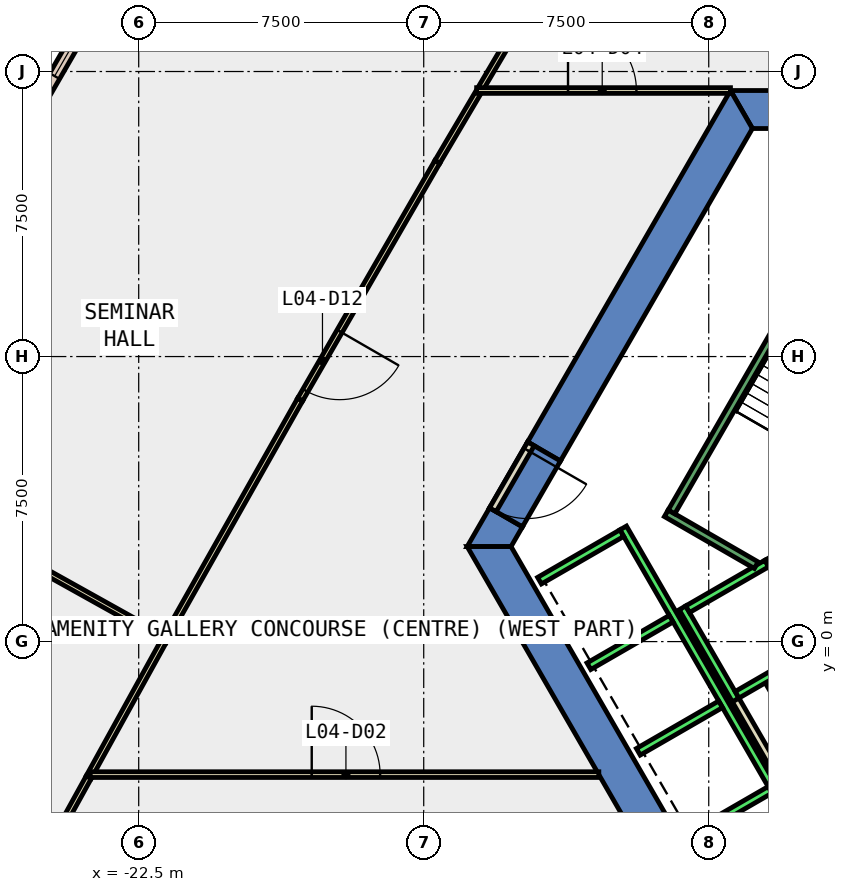
"""IFC4 building model, lengths in metres.
Left out: names, types, materials, properties, quantities, classifications, styles, units other than length and angle.
Written with IfcOpenShell. Run it as: python <this file> out.ifc"""

import sys

from ifc_helpers import new_model, si_unit, direction, frame, frame_2d, origin, place, context, subcontext, project, spatial, polyline, rectangle, outline, extrude, element, fill, save


model = new_model("IFC4")
c1 = context("Model", 3, precision=1e-05, world=origin(), true_north=direction((0.0, 1.0)))
c2 = subcontext(c1, "Body", "Model", "MODEL_VIEW")
j1 = project(units=[si_unit("LENGTHUNIT", "METRE"), si_unit("PLANEANGLEUNIT", "RADIAN")], contexts=[c1])
p1 = place(None, origin())
s1 = spatial("IfcSite", under=j1, at=p1, CompositionType="ELEMENT")
p2 = place(p1, origin())
s2 = spatial("IfcBuilding", under=s1, at=p2, CompositionType="ELEMENT")
p3 = place(p2, frame((0.0, 0.0, 25.0)))
s3 = spatial("IfcBuildingStorey", under=s2, at=p3, CompositionType="ELEMENT", Elevation=25.0)
p4 = place(p3, frame((0.0, 0.0, -0.45)))
e1 = element("IfcWall", 1, at=p4, inside=s3, PredefinedType="SHEAR", context=c2, shape_type="SweptSolid", body=[
    extrude(outline(polyline([(-4.55, 13.5), (-4.55, 14.5), (-6.928, 14.5), (-6.351, 13.5), (-4.55, 13.5)])), origin(), (0.0, 0.0, 1.0), 5.0),
])
p5 = place(p3, frame((0.0, 0.0, -0.45)))
e2 = element("IfcWall", 2, at=p5, inside=s3, PredefinedType="SHEAR", context=c2, shape_type="SweptSolid", body=[
    extrude(outline(polyline([(-12.267, 5.252), (-11.402, 4.752), (-6.351, 13.5), (-6.928, 14.5), (-12.267, 5.252)])), origin(), (0.0, 0.0, 1.0), 5.0),
])
p6 = place(p3, frame((0.0, 0.0, -0.45)))
e3 = element("IfcWall", 3, at=p6, inside=s3, PredefinedType="SHEAR", context=c2, shape_type="SweptSolid", body=[
    extrude(outline(polyline([(-12.402, 3.02), (-13.267, 3.52), (-13.856, 2.5), (-12.702, 2.5), (-12.402, 3.02)])), origin(), (0.0, 0.0, 1.0), 5.0),
])
p7 = place(p3, frame((0.0, 0.0, 3.6)))
e4 = element("IfcWall", 4, at=p7, inside=s3, PredefinedType="SHEAR", context=c2, shape_type="SweptSolid", body=[
    extrude(outline(polyline([(-13.267, 3.52), (-12.402, 3.02), (-11.402, 4.752), (-12.267, 5.252), (-13.267, 3.52)])), origin(), (0.0, 0.0, 1.0), 0.95),
])
p8 = place(p3, frame((0.0, 0.0, -0.45)))
e5 = element("IfcWall", 5, at=p8, inside=s3, PredefinedType="SHEAR", context=c2, shape_type="SweptSolid", body=[
    extrude(outline(polyline([(-13.856, 2.5), (-6.928, -9.5), (-6.351, -8.5), (-12.702, 2.5), (-13.856, 2.5)])), origin(), (0.0, 0.0, 1.0), 5.0),
])
p9 = place(p3, frame((-23.447, 17.071, 0.0), z_axis=(0.0, 0.0, 1.0), x_axis=(-0.499939977436, -0.866060055055, 0.0)))
e6 = element("IfcWall", 6, at=p9, inside=s3, PredefinedType="STANDARD", context=c2, shape_type="SweptSolid", body=[
    extrude(rectangle(XDim=6.121, YDim=0.3, at=frame_2d((3.061, 0.0))), origin(), (0.0, 0.0, 1.0), 4.55),
])
p10 = place(p9, frame((0.53, 0.0, 1.0)))
e7 = element("IfcOpeningElement", 7, at=p10, cuts=e6, PredefinedType="OPENING", context=c2, shape_type="SweptSolid", body=[
    extrude(rectangle(XDim=2.0, YDim=3.2, at=frame_2d((1.0, 1.6))), frame((0.0, 0.16, 0.0), z_axis=(0.0, -1.0, 0.0), x_axis=(1.0, 0.0, 0.0)), (0.0, 0.0, 1.0), 0.32),
])
p11 = place(p9, frame((3.591, 0.0, 1.0)))
e8 = element("IfcOpeningElement", 8, at=p11, cuts=e6, PredefinedType="OPENING", context=c2, shape_type="SweptSolid", body=[
    extrude(rectangle(XDim=2.0, YDim=3.2, at=frame_2d((1.0, 1.6))), frame((0.0, 0.16, 0.0), z_axis=(0.0, -1.0, 0.0), x_axis=(1.0, 0.0, 0.0)), (0.0, 0.0, 1.0), 0.32),
])
p12 = place(p3, frame((-5.126, -2.422, 0.0), z_axis=(0.0, 0.0, 1.0), x_axis=(-0.500062241894, 0.865989465428, 0.0)))
e9 = element("IfcWall", 9, at=p12, inside=s3, PredefinedType="PARTITIONING", context=c2, shape_type="SweptSolid", body=[
    extrude(rectangle(XDim=1.7, YDim=0.2, at=frame_2d((0.85, 0.0))), origin(), (0.0, 0.0, 1.0), 4.55),
])
p13 = place(p3, frame((-5.492, -3.788, 0.0), z_axis=(0.0, 0.0, 1.0), x_axis=(-0.500008949224, 0.866020236886, 0.0)))
e10 = element("IfcWall", 10, at=p13, inside=s3, PredefinedType="PARTITIONING", context=c2, shape_type="SweptSolid", body=[
    extrude(rectangle(XDim=2.68, YDim=0.2, at=frame_2d((1.34, 0.0))), origin(), (0.0, 0.0, 1.0), 4.55),
])
p14 = place(p3, frame((-21.735, 0.044, 0.0), z_axis=(0.0, 0.0, 1.0), x_axis=(-0.873435565137, 0.486939743248, 0.0)))
e11 = element("IfcWall", 11, at=p14, inside=s3, PredefinedType="PARTITIONING", context=c2, shape_type="SweptSolid", body=[
    extrude(rectangle(XDim=8.356, YDim=0.15, at=frame_2d((4.178, 0.0))), origin(), (0.0, 0.0, 1.0), 4.55),
])
p15 = place(p3, frame((-13.571, 14.435, 0.0), z_axis=(0.0, 0.0, 1.0), x_axis=(-0.508494775472, -0.861065074961, 0.0)))
e12 = element("IfcWall", 12, at=p15, inside=s3, PredefinedType="PARTITIONING", context=c2, shape_type="SweptSolid", body=[
    extrude(rectangle(XDim=2.104, YDim=0.15, at=frame_2d((1.052, 0.0))), origin(), (0.0, 0.0, 1.0), 4.55),
])
p16 = place(p3, frame((-14.641, 12.623, 0.0), z_axis=(0.0, 0.0, 1.0), x_axis=(-0.499941911129, -0.866058938812, 0.0)))
e13 = element("IfcWall", 13, at=p16, inside=s3, PredefinedType="PARTITIONING", context=c2, shape_type="SweptSolid", body=[
    extrude(rectangle(XDim=7.222, YDim=0.15, at=frame_2d((3.611, 0.0))), origin(), (0.0, 0.0, 1.0), 4.55),
])
p17 = place(p16, frame((5.147, 0.0, 0.0)))
e14 = element("IfcOpeningElement", 14, at=p17, cuts=e13, PredefinedType="OPENING", context=c2, shape_type="SweptSolid", body=[
    extrude(rectangle(XDim=1.8, YDim=2.1, at=frame_2d((0.9, 1.05))), frame((0.0, 0.085, 0.0), z_axis=(0.0, -1.0, 0.0), x_axis=(1.0, 0.0, 0.0)), (0.0, 0.0, 1.0), 0.17),
])
p18 = place(p3, frame((-18.252, 6.368, 0.0), z_axis=(0.0, 0.0, 1.0), x_axis=(-0.491550482328, -0.87084908183, 0.0)))
e15 = element("IfcWall", 15, at=p18, inside=s3, PredefinedType="PARTITIONING", context=c2, shape_type="SweptSolid", body=[
    extrude(rectangle(XDim=7.145, YDim=0.15, at=frame_2d((3.572, 0.0))), origin(), (0.0, 0.0, 1.0), 4.55),
])
p19 = place(p3, frame((-10.968, 18.845, 0.0), z_axis=(0.0, 0.0, 1.0), x_axis=(-0.508429753822, -0.861103469641, 0.0)))
e16 = element("IfcWall", 16, at=p19, inside=s3, PredefinedType="PARTITIONING", context=c2, shape_type="SweptSolid", body=[
    extrude(rectangle(XDim=4.97, YDim=0.15, at=frame_2d((2.485, 0.0))), origin(), (0.0, 0.0, 1.0), 4.55),
])
p20 = place(p3, frame((-25.294, -6.248, 0.0), z_axis=(0.0, 0.0, 1.0), x_axis=(0.483368016909, 0.875417249219, 0.0)))
e17 = element("IfcWall", 17, at=p20, inside=s3, PredefinedType="PARTITIONING", context=c2, shape_type="SweptSolid", body=[
    extrude(rectangle(XDim=3.064, YDim=0.15, at=frame_2d((1.532, 0.0))), origin(), (0.0, 0.0, 1.0), 4.55),
])
p21 = place(p3, frame((-21.84, 0.01, 0.0), z_axis=(0.0, 0.0, 1.0), x_axis=(-0.483357057036, -0.875423300703, 0.0)))
e18 = element("IfcWall", 18, at=p21, inside=s3, PredefinedType="PARTITIONING", context=c2, shape_type="SweptSolid", body=[
    extrude(rectangle(XDim=4.084, YDim=0.15, at=frame_2d((2.042, 0.0))), origin(), (0.0, 0.0, 1.0), 4.55),
])
p22 = place(p3, frame((-23.777, -3.5, 0.0), z_axis=(0.0, 0.0, 1.0), x_axis=(1.0, 0.0, 0.0)))
e19 = element("IfcWall", 19, at=p22, inside=s3, PredefinedType="PARTITIONING", context=c2, shape_type="SweptSolid", body=[
    extrude(rectangle(XDim=13.385, YDim=0.15, at=frame_2d((6.692, 0.0))), origin(), (0.0, 0.0, 1.0), 4.55),
])
p23 = place(p22, frame((5.83, 0.0, 0.0)))
e20 = element("IfcOpeningElement", 20, at=p23, cuts=e19, PredefinedType="OPENING", context=c2, shape_type="SweptSolid", body=[
    extrude(rectangle(XDim=1.8, YDim=2.1, at=frame_2d((0.9, 1.05))), frame((0.0, 0.085, 0.0), z_axis=(0.0, -1.0, 0.0), x_axis=(1.0, 0.0, 0.0)), (0.0, 0.0, 1.0), 0.17),
])
p24 = place(p3, frame((-13.608, 14.5, 0.0), z_axis=(0.0, 0.0, 1.0), x_axis=(1.0, 0.0, 0.0)))
e21 = element("IfcWall", 21, at=p24, inside=s3, PredefinedType="PARTITIONING", context=c2, shape_type="SweptSolid", body=[
    extrude(rectangle(XDim=6.68, YDim=0.15, at=frame_2d((3.34, 0.0))), origin(), (0.0, 0.0, 1.0), 4.55),
])
p25 = place(p24, frame((2.405, 0.0, 0.0)))
e22 = element("IfcOpeningElement", 22, at=p25, cuts=e21, PredefinedType="OPENING", context=c2, shape_type="SweptSolid", body=[
    extrude(rectangle(XDim=1.8, YDim=2.1, at=frame_2d((0.9, 1.05))), frame((0.0, 0.085, 0.0), z_axis=(0.0, -1.0, 0.0), x_axis=(1.0, 0.0, 0.0)), (0.0, 0.0, 1.0), 0.17),
])
p26 = place(p3, frame((-12.18, 5.202, 0.0), z_axis=(0.0, 0.0, 1.0), x_axis=(-0.50002537861, -0.866010750942, 0.0)))
e23 = element("IfcWall", 23, at=p26, inside=s3, PredefinedType="PARTITIONING", context=c2, shape_type="SweptSolid", body=[
    extrude(rectangle(XDim=2.0, YDim=0.2, at=frame_2d((1.0, 0.0))), origin(), (0.0, 0.0, 1.0), 2.4),
])
p27 = place(p26, frame((0.19, 0.0, 0.0)))
e24 = element("IfcOpeningElement", 24, at=p27, cuts=e23, PredefinedType="OPENING", context=c2, shape_type="SweptSolid", body=[
    extrude(rectangle(XDim=1.8, YDim=2.1, at=frame_2d((0.9, 1.05))), frame((0.0, 0.11, 0.0), z_axis=(0.0, -1.0, 0.0), x_axis=(1.0, 0.0, 0.0)), (0.0, 0.0, 1.0), 0.22),
])
p28 = place(p3, frame((-5.94, 2.188, 0.0), z_axis=(0.0, 0.0, 1.0), x_axis=(0.49994636267, -0.866056369097, 0.0)))
e25 = element("IfcWall", 25, at=p28, inside=s3, PredefinedType="STANDARD", context=c2, shape_type="SweptSolid", body=[
    extrude(rectangle(XDim=2.8, YDim=0.2, at=frame_2d((1.4, 0.0))), origin(), (0.0, 0.0, 1.0), 4.55),
])
p29 = place(p28, frame((1.225, 0.0, 0.0)))
e26 = element("IfcOpeningElement", 26, at=p29, cuts=e25, PredefinedType="OPENING", context=c2, shape_type="SweptSolid", body=[
    extrude(rectangle(XDim=1.1, YDim=2.1, at=frame_2d((0.55, 1.05))), frame((0.0, 0.11, 0.0), z_axis=(0.0, -1.0, 0.0), x_axis=(1.0, 0.0, 0.0)), (0.0, 0.0, 1.0), 0.22),
])
p30 = place(p3, frame((-8.192, 0.888, 0.0), z_axis=(0.0, 0.0, 1.0), x_axis=(0.49994636267, -0.866056369097, 0.0)))
e27 = element("IfcWall", 27, at=p30, inside=s3, PredefinedType="STANDARD", context=c2, shape_type="SweptSolid", body=[
    extrude(rectangle(XDim=2.8, YDim=0.2, at=frame_2d((1.4, 0.0))), origin(), (0.0, 0.0, 1.0), 4.55),
])
for number, where, z_axis, x_axis in (
    (28, (-5.977, 2.052, 0.0), (0.0, 0.0, 1.0), (-0.866, -0.5, 0.0)),
    (29, (-4.677, -0.2, 0.0), (0.0, 0.0, 1.0), (-0.866, -0.5, 0.0)),
):
    element("IfcWall", number, at=place(p3, frame(where, z_axis=z_axis, x_axis=x_axis)), inside=s3, PredefinedType="STANDARD", context=c2, shape_type="SweptSolid", body=[
        extrude(rectangle(XDim=2.399, YDim=0.2, at=frame_2d((1.2, 0.0))), origin(), (0.0, 0.0, 1.0), 4.55),
    ])
p31 = place(p3, frame((-9.751, 2.99, 0.0), z_axis=(0.0, 0.0, 1.0), x_axis=(0.50000090737, -0.866024879913, 0.0)))
e30 = element("IfcWall", 30, at=p31, inside=s3, PredefinedType="STANDARD", context=c2, shape_type="SweptSolid", body=[
    extrude(rectangle(XDim=10.6, YDim=0.2, at=frame_2d((5.3, 0.0))), origin(), (0.0, 0.0, 1.0), 4.55),
])
p32 = place(p3, frame((-9.788, 2.853, 0.0), z_axis=(0.0, 0.0, 1.0), x_axis=(-0.865998541277, -0.500046524342, 0.0)))
e31 = element("IfcWall", 31, at=p32, inside=s3, PredefinedType="STANDARD", context=c2, shape_type="SweptSolid", body=[
    extrude(rectangle(XDim=2.5, YDim=0.2, at=frame_2d((1.25, 0.0))), origin(), (0.0, 0.0, 1.0), 4.55),
])
for number, where, z_axis, x_axis in (
    (32, (-8.488, 0.602, 0.0), (0.0, 0.0, 1.0), (-0.866, -0.5, 0.0)),
    (33, (-7.188, -1.65, 0.0), (0.0, 0.0, 1.0), (-0.866, -0.5, 0.0)),
    (34, (-5.888, -3.902, 0.0), (0.0, 0.0, 1.0), (-0.866, -0.5, 0.0)),
):
    element("IfcWall", number, at=place(p3, frame(where, z_axis=z_axis, x_axis=x_axis)), inside=s3, PredefinedType="STANDARD", context=c2, shape_type="SweptSolid", body=[
        extrude(rectangle(XDim=2.5, YDim=0.2, at=frame_2d((1.25, 0.0))), origin(), (0.0, 0.0, 1.0), 4.55),
    ])
p33 = place(p3, frame((-6.25, 2.01, 0.0), z_axis=(0.0, 0.0, 1.0), x_axis=(-0.86611865017, 0.499838457731, 0.0)))
e35 = element("IfcWall", 35, at=p33, inside=s3, PredefinedType="STANDARD", context=c2, shape_type="SweptSolid", body=[
    extrude(rectangle(XDim=2.733, YDim=0.2, at=frame_2d((1.366, 0.0))), origin(), (0.0, 0.0, 1.0), 4.55),
])
p34 = place(p3, frame((-5.03, 9.388, 0.0), z_axis=(0.0, 0.0, 1.0), x_axis=(-0.499978703459, -0.866037698999, 0.0)))
e36 = element("IfcWall", 36, at=p34, inside=s3, PredefinedType="STANDARD", context=c2, shape_type="SweptSolid", body=[
    extrude(rectangle(XDim=6.9, YDim=0.2, at=frame_2d((3.45, 0.0))), origin(), (0.0, 0.0, 1.0), 4.55),
])
p35 = place(p10, origin())
e37 = element("IfcWindow", 37, at=p35, inside=s3, PartitioningType="SINGLE_PANEL", PredefinedType="WINDOW", context=c2, shape_type="SweptSolid", body=[
    extrude(rectangle(XDim=2.0, YDim=3.2, at=frame_2d((1.0, 1.6))), frame((0.0, 0.03, 0.0), z_axis=(0.0, -1.0, 0.0), x_axis=(1.0, 0.0, 0.0)), (0.0, 0.0, 1.0), 0.06),
])
fill(e7, e37)
p36 = place(p23, origin())
e38 = element("IfcDoor", 38, at=p36, inside=s3, OperationType="DOUBLE_DOOR_SINGLE_SWING", PredefinedType="DOOR", context=c2, shape_type="SweptSolid", body=[
    extrude(rectangle(XDim=1.8, YDim=2.1, at=frame_2d((0.9, 1.05))), frame((0.0, 0.025, 0.0), z_axis=(0.0, -1.0, 0.0), x_axis=(1.0, 0.0, 0.0)), (0.0, 0.0, 1.0), 0.05),
])
fill(e20, e38)
p37 = place(p25, origin())
e39 = element("IfcDoor", 39, at=p37, inside=s3, OperationType="DOUBLE_DOOR_SINGLE_SWING", PredefinedType="DOOR", context=c2, shape_type="SweptSolid", body=[
    extrude(rectangle(XDim=1.8, YDim=2.1, at=frame_2d((0.9, 1.05))), frame((0.0, 0.025, 0.0), z_axis=(0.0, -1.0, 0.0), x_axis=(1.0, 0.0, 0.0)), (0.0, 0.0, 1.0), 0.05),
])
fill(e22, e39)
p38 = place(p17, origin())
e40 = element("IfcDoor", 40, at=p38, inside=s3, OperationType="DOUBLE_DOOR_SINGLE_SWING", PredefinedType="DOOR", context=c2, shape_type="SweptSolid", body=[
    extrude(rectangle(XDim=1.8, YDim=2.1, at=frame_2d((0.9, 1.05))), frame((0.0, 0.025, 0.0), z_axis=(0.0, -1.0, 0.0), x_axis=(1.0, 0.0, 0.0)), (0.0, 0.0, 1.0), 0.05),
])
fill(e14, e40)
p39 = place(p27, origin())
e41 = element("IfcDoor", 41, at=p39, inside=s3, OperationType="DOUBLE_DOOR_SINGLE_SWING", PredefinedType="DOOR", context=c2, shape_type="SweptSolid", body=[
    extrude(rectangle(XDim=1.8, YDim=2.1, at=frame_2d((0.9, 1.05))), frame((0.0, 0.025, 0.0), z_axis=(0.0, -1.0, 0.0), x_axis=(1.0, 0.0, 0.0)), (0.0, 0.0, 1.0), 0.05),
])
fill(e24, e41)
save(model, sys.argv[1])
